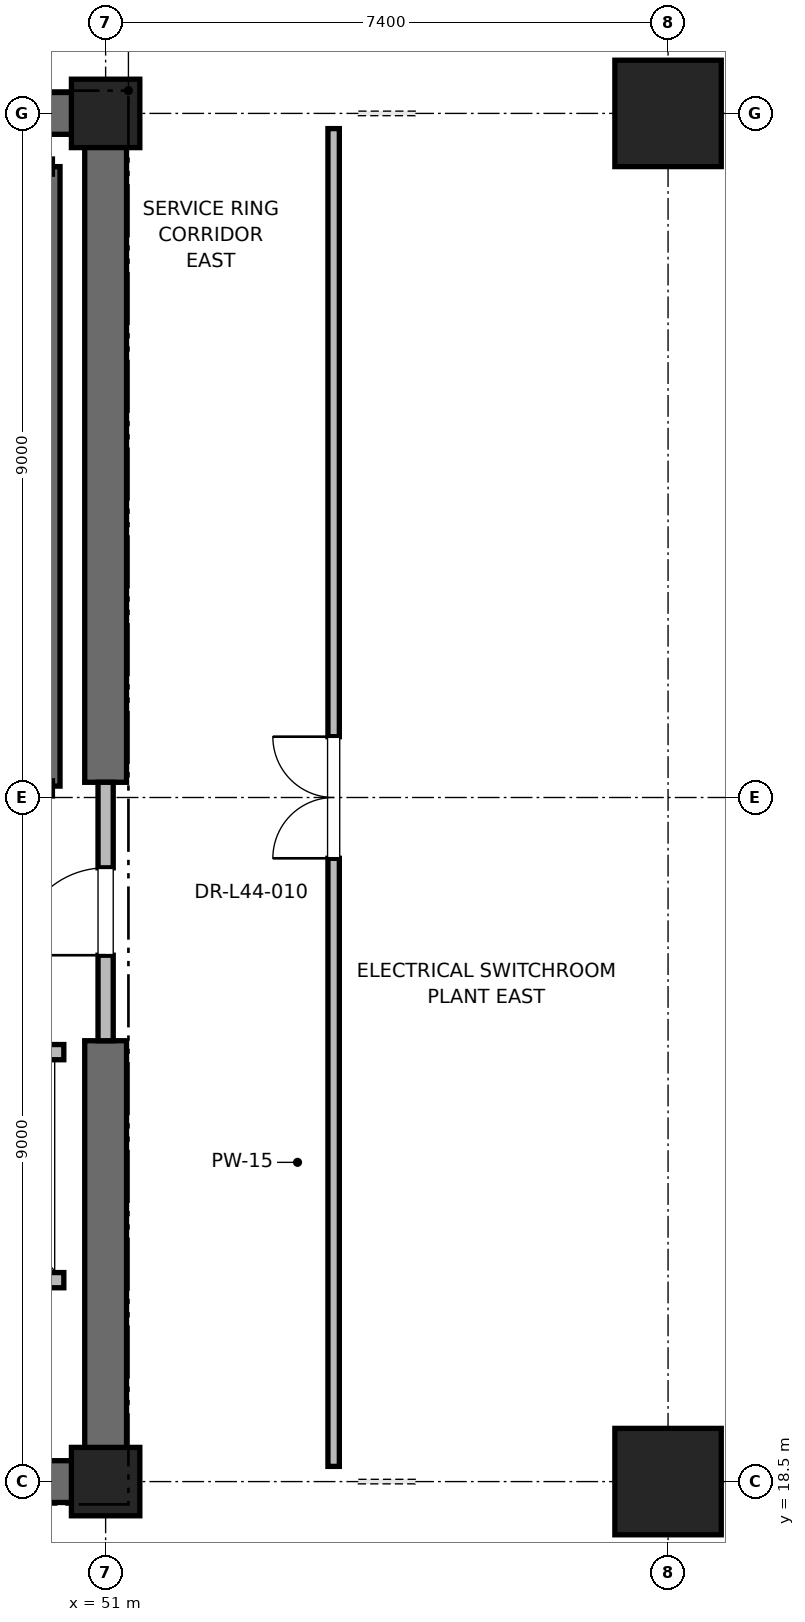
"""IFC4 building model, lengths in metres.
Left out: names, types, materials, properties, quantities, classifications, styles, units other than length and angle.
Written with IfcOpenShell. Run it as: python <this file> out.ifc"""

import sys

from ifc_helpers import new_model, si_unit, direction, frame, frame_2d, origin, origin_2d, place, context, subcontext, project, spatial, rectangle, extrude, element, fill, save


model = new_model("IFC4")
c1 = context("Model", 3, precision=1e-05, world=origin(), true_north=direction((0.0, 1.0)))
c2 = subcontext(c1, "Body", "Model", "MODEL_VIEW")
j1 = project(units=[si_unit("LENGTHUNIT", "METRE"), si_unit("PLANEANGLEUNIT", "RADIAN")], contexts=[c1])
p1 = place(None, origin())
s1 = spatial("IfcSite", under=j1, at=p1, CompositionType="ELEMENT")
p2 = place(p1, origin())
s2 = spatial("IfcBuilding", under=s1, at=p2, CompositionType="ELEMENT")
p3 = place(p2, frame((0.0, 0.0, 189.4)))
s3 = spatial("IfcBuildingStorey", under=s2, at=p3, CompositionType="ELEMENT", Elevation=189.4)
for number, where, z_axis, x_axis in (
    (1, (58.4, 18.5, 0.0), (0.0, 0.0, 1.0), (1.0, 0.0, 0.0)),
    (2, (58.4, 36.5, 0.0), (0.0, 0.0, 1.0), (1.0, 0.0, 0.0)),
):
    element("IfcColumn", number, at=place(p3, frame(where, z_axis=z_axis, x_axis=x_axis)), inside=s3, PredefinedType="COLUMN", context=c2, shape_type="SweptSolid", body=[
        extrude(rectangle(XDim=1.4, YDim=1.4, at=origin_2d()), origin(), (0.0, 0.0, 1.0), 5.4),
    ])
for number, where, z_axis, x_axis in (
    (3, (51.0, 18.5, 0.0), (0.0, 0.0, 1.0), (1.0, 0.0, 0.0)),
    (4, (51.0, 36.5, 0.0), (0.0, 0.0, 1.0), (1.0, 0.0, 0.0)),
):
    element("IfcColumn", number, at=place(p3, frame(where, z_axis=z_axis, x_axis=x_axis)), inside=s3, PredefinedType="PILASTER", context=c2, shape_type="SweptSolid", body=[
        extrude(rectangle(XDim=0.9, YDim=0.9, at=origin_2d()), origin(), (0.0, 0.0, 1.0), 5.4),
    ])
p4 = place(p3, frame((41.8, 18.5, 0.0), z_axis=(0.0, 0.0, 1.0), x_axis=(1.0, 0.0, 0.0)))
e5 = element("IfcWall", 5, at=p4, inside=s3, PredefinedType="SHEAR", context=c2, shape_type="SweptSolid", body=[
    extrude(rectangle(XDim=9.2, YDim=0.55, at=frame_2d((4.6, 0.0))), origin(), (0.0, 0.0, 1.0), 5.1),
])
for number, where, z_axis, x_axis in (
    (6, (45.2, 36.5, 0.0), (0.0, 0.0, 1.0), (1.0, 0.0, 0.0)),
    (7, (51.0, 18.5, 0.0), (0.0, 0.0, 1.0), (0.0, 1.0, 0.0)),
):
    element("IfcWall", number, at=place(p3, frame(where, z_axis=z_axis, x_axis=x_axis)), inside=s3, PredefinedType="SHEAR", context=c2, shape_type="SweptSolid", body=[
        extrude(rectangle(XDim=5.8, YDim=0.55, at=frame_2d((2.9, 0.0))), origin(), (0.0, 0.0, 1.0), 5.1),
    ])
p5 = place(p3, frame((51.0, 27.7, 0.0), z_axis=(0.0, 0.0, 1.0), x_axis=(0.0, 1.0, 0.0)))
e8 = element("IfcWall", 8, at=p5, inside=s3, PredefinedType="SHEAR", context=c2, shape_type="SweptSolid", body=[
    extrude(rectangle(XDim=8.8, YDim=0.55, at=frame_2d((4.4, 0.0))), origin(), (0.0, 0.0, 1.0), 5.1),
])
p6 = place(p3, frame((50.3, 27.65, 0.0), z_axis=(0.0, 0.0, 1.0), x_axis=(0.0, 1.0, 0.0)))
e9 = element("IfcWall", 9, at=p6, inside=s3, PredefinedType="SOLIDWALL", context=c2, shape_type="SweptSolid", body=[
    extrude(rectangle(XDim=8.15, YDim=0.2, at=frame_2d((4.075, 0.0))), origin(), (0.0, 0.0, 1.0), 5.1),
])
p7 = place(p3, frame((51.0, 24.3, 0.0), z_axis=(0.0, 0.0, 1.0), x_axis=(0.0, 1.0, 0.0)))
e10 = element("IfcWall", 10, at=p7, inside=s3, PredefinedType="PARTITIONING", context=c2, shape_type="SweptSolid", body=[
    extrude(rectangle(XDim=3.4, YDim=0.2, at=frame_2d((1.7, 0.0))), origin(), (0.0, 0.0, 1.0), 4.08),
])
p8 = place(p7, frame((1.125, 0.0, 0.0)))
e11 = element("IfcOpeningElement", 11, at=p8, cuts=e10, PredefinedType="OPENING", context=c2, shape_type="SweptSolid", body=[
    extrude(rectangle(XDim=1.15, YDim=2.2, at=frame_2d((0.575, 1.1))), frame((0.0, 0.1, 0.0), z_axis=(0.0, -1.0, 0.0), x_axis=(1.0, 0.0, 0.0)), (0.0, 0.0, 1.0), 0.2),
])
p9 = place(p3, frame((47.85, 21.15, 0.0), z_axis=(0.0, 0.0, 1.0), x_axis=(1.0, 0.0, 0.0)))
e12 = element("IfcWall", 12, at=p9, inside=s3, PredefinedType="SOLIDWALL", context=c2, shape_type="SweptSolid", body=[
    extrude(rectangle(XDim=2.6, YDim=0.2, at=frame_2d((1.3, 0.0))), origin(), (0.0, 0.0, 1.0), 5.1),
])
p10 = place(p3, frame((50.45, 24.15, 0.0), z_axis=(0.0, 0.0, 1.0), x_axis=(-1.0, 0.0, 0.0)))
e13 = element("IfcWall", 13, at=p10, inside=s3, PredefinedType="SOLIDWALL", context=c2, shape_type="SweptSolid", body=[
    extrude(rectangle(XDim=2.6, YDim=0.2, at=frame_2d((1.3, 0.0))), origin(), (0.0, 0.0, 1.0), 4.08),
])
p11 = place(p10, frame((0.75, 0.0, 0.0)))
e14 = element("IfcOpeningElement", 14, at=p11, cuts=e13, PredefinedType="OPENING", context=c2, shape_type="SweptSolid", body=[
    extrude(rectangle(XDim=1.1, YDim=2.2, at=frame_2d((0.55, 1.1))), frame((0.0, 0.1, 0.0), z_axis=(0.0, -1.0, 0.0), x_axis=(1.0, 0.0, 0.0)), (0.0, 0.0, 1.0), 0.2),
])
p12 = place(p3, frame((54.0, 18.7, 0.0), z_axis=(0.0, 0.0, 1.0), x_axis=(0.0, 1.0, 0.0)))
e15 = element("IfcWall", 15, at=p12, inside=s3, PredefinedType="PARTITIONING", context=c2, shape_type="SweptSolid", body=[
    extrude(rectangle(XDim=17.6, YDim=0.15, at=frame_2d((8.8, 0.0))), origin(), (0.0, 0.0, 1.0), 2.85),
])
p13 = place(p12, frame((8.0, 0.0, 0.0)))
e16 = element("IfcOpeningElement", 16, at=p13, cuts=e15, PredefinedType="OPENING", context=c2, shape_type="SweptSolid", body=[
    extrude(rectangle(XDim=1.6, YDim=2.25, at=frame_2d((0.8, 1.125))), frame((0.0, 0.075, 0.0), z_axis=(0.0, -1.0, 0.0), x_axis=(1.0, 0.0, 0.0)), (0.0, 0.0, 1.0), 0.15),
])
p14 = place(p8, origin())
e17 = element("IfcDoor", 17, at=p14, inside=s3, OperationType="SINGLE_SWING_LEFT", PredefinedType="DOOR", context=c2, shape_type="SweptSolid", body=[
    extrude(rectangle(XDim=1.15, YDim=2.2, at=frame_2d((0.575, 1.1))), frame((0.0, 0.025, 0.0), z_axis=(0.0, -1.0, 0.0), x_axis=(1.0, 0.0, 0.0)), (0.0, 0.0, 1.0), 0.05),
])
fill(e11, e17)
p15 = place(p13, origin())
e18 = element("IfcDoor", 18, at=p15, inside=s3, OperationType="DOUBLE_DOOR_SINGLE_SWING", PredefinedType="DOOR", context=c2, shape_type="SweptSolid", body=[
    extrude(rectangle(XDim=1.6, YDim=2.25, at=frame_2d((0.8, 1.125))), frame((0.0, 0.025, 0.0), z_axis=(0.0, -1.0, 0.0), x_axis=(1.0, 0.0, 0.0)), (0.0, 0.0, 1.0), 0.05),
])
fill(e16, e18)
save(model, sys.argv[1])
